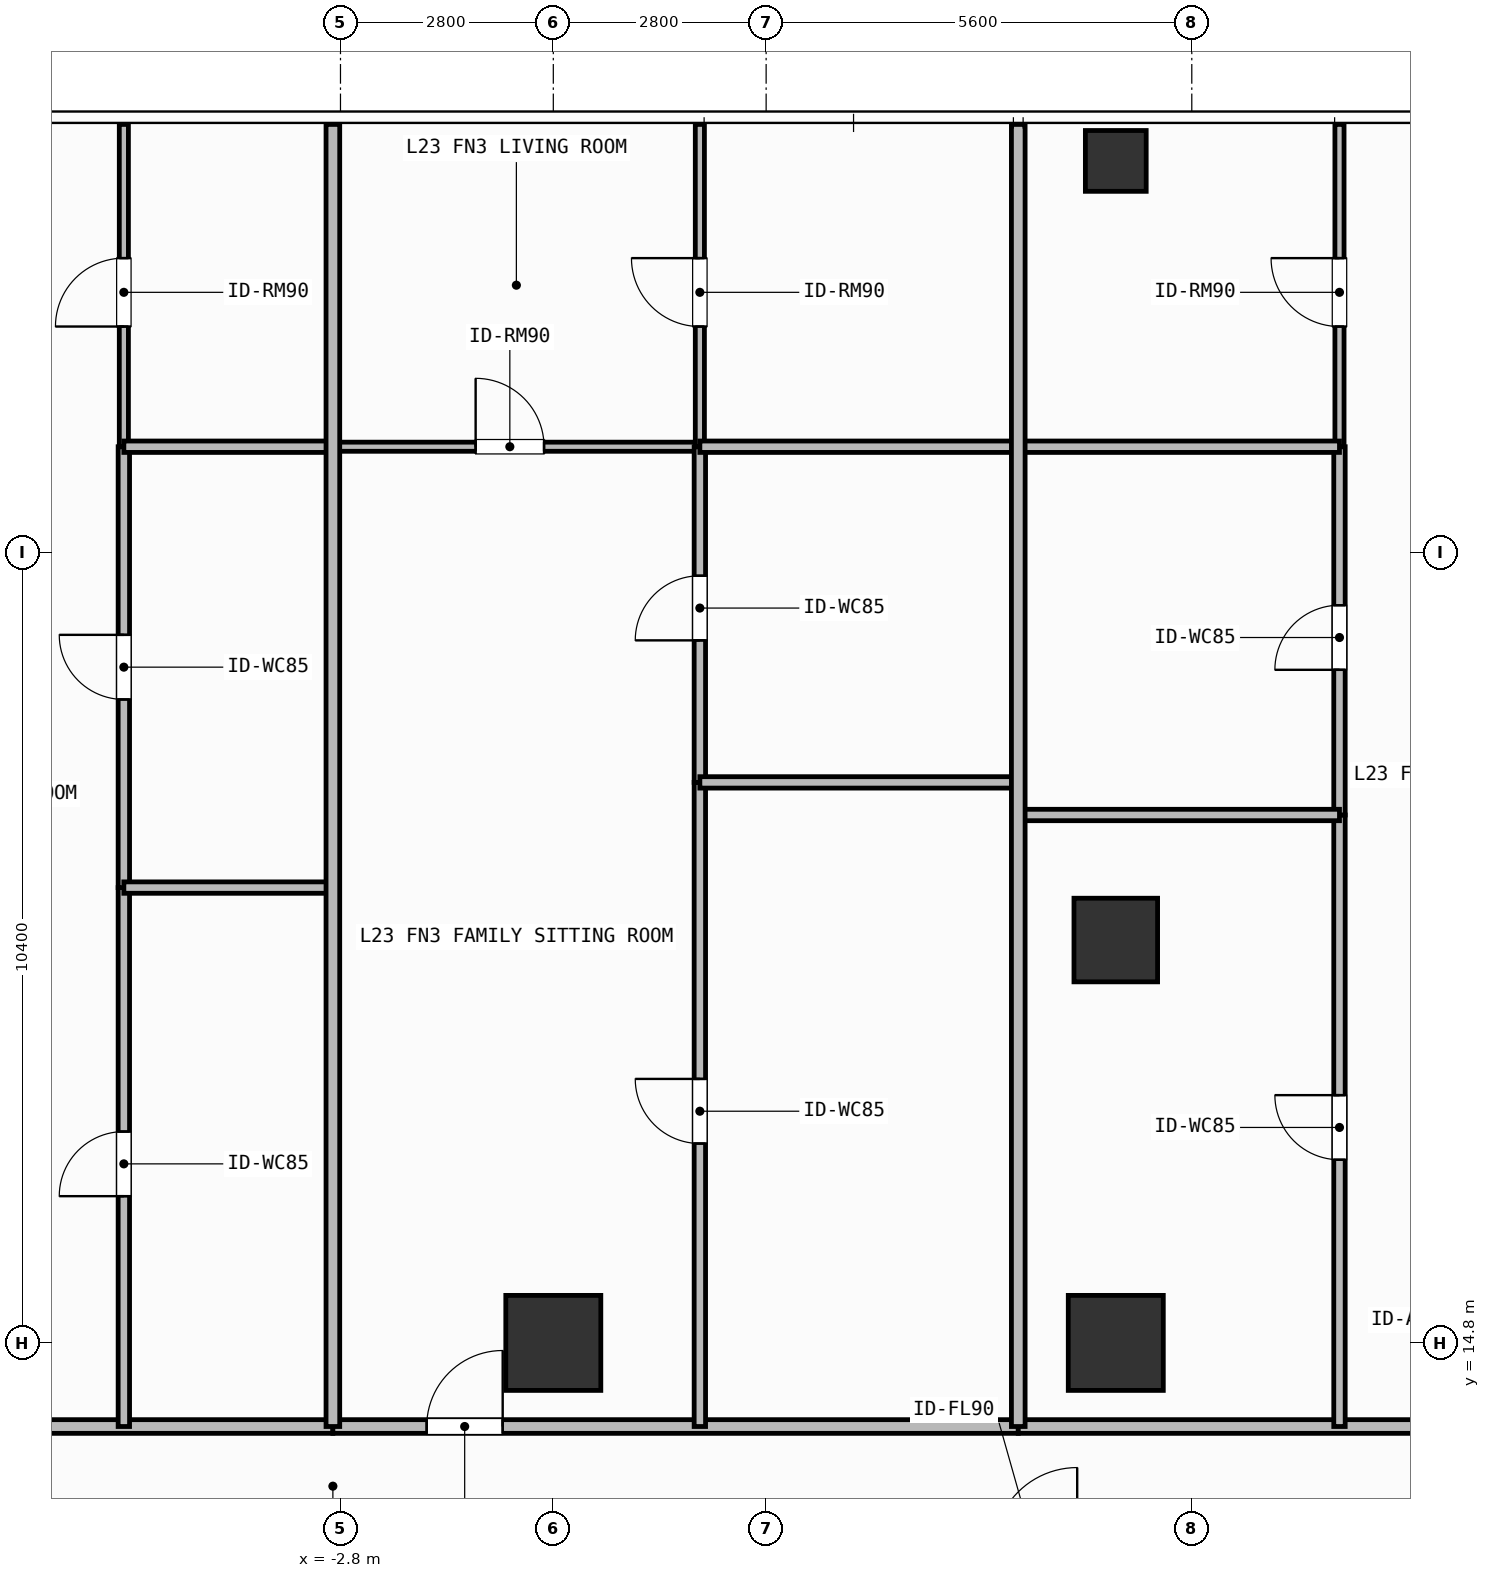
"""IFC4 building model, lengths in metres.
Left out: names, types, materials, properties, quantities, classifications, styles, units other than length and angle.
Written with IfcOpenShell. Run it as: python <this file> out.ifc"""

import sys

from ifc_helpers import new_model, si_unit, direction, frame, frame_2d, origin, origin_2d, place, context, subcontext, project, spatial, rectangle, hollow_rectangle, extrude, element, fill, save


model = new_model("IFC4")
c1 = context("Model", 3, precision=1e-05, world=origin(), true_north=direction((0.0, 1.0)))
c2 = subcontext(c1, "Body", "Model", "MODEL_VIEW")
j1 = project(units=[si_unit("LENGTHUNIT", "METRE"), si_unit("PLANEANGLEUNIT", "RADIAN")], contexts=[c1])
p1 = place(None, origin())
s1 = spatial("IfcSite", under=j1, at=p1, CompositionType="ELEMENT")
p2 = place(p1, origin())
s2 = spatial("IfcBuilding", under=s1, at=p2, CompositionType="ELEMENT")
p3 = place(p2, frame((0.0, 0.0, 93.0)))
s3 = spatial("IfcBuildingStorey", under=s2, at=p3, CompositionType="ELEMENT", Elevation=93.0)
for number, where, z_axis, x_axis in (
    (1, (0.0, 14.8, 0.0), (0.0, 0.0, 1.0), (1.0, 0.0, 0.0)),
    (2, (7.4, 14.8, 0.0), (0.0, 0.0, 1.0), (1.0, 0.0, 0.0)),
):
    element("IfcColumn", number, at=place(p3, frame(where, z_axis=z_axis, x_axis=x_axis)), inside=s3, PredefinedType="COLUMN", context=c2, shape_type="SweptSolid", body=[
        extrude(rectangle(XDim=1.25, YDim=1.25, at=origin_2d()), origin(), (0.0, 0.0, 1.0), 3.9),
    ])
p4 = place(p3, frame((7.4, 20.1, 0.0), z_axis=(0.0, 0.0, 1.0), x_axis=(1.0, 0.0, 0.0)))
e3 = element("IfcColumn", 3, at=p4, inside=s3, PredefinedType="COLUMN", context=c2, shape_type="SweptSolid", body=[
    extrude(rectangle(XDim=1.1, YDim=1.1, at=origin_2d()), origin(), (0.0, 0.0, 1.0), 3.9),
])
p5 = place(p3, frame((7.4, 30.35, 0.0), z_axis=(0.0, 0.0, 1.0), x_axis=(1.0, 0.0, 0.0)))
e4 = element("IfcColumn", 4, at=p5, inside=s3, PredefinedType="COLUMN", context=c2, shape_type="SweptSolid", body=[
    extrude(hollow_rectangle(XDim=0.8, YDim=0.8, WallThickness=0.036, at=origin_2d()), origin(), (0.0, 0.0, 1.0), 3.9),
])
p6 = place(p3, frame((-9.786, 13.7, 0.0), z_axis=(0.0, 0.0, 1.0), x_axis=(1.0, 0.0, 0.0)))
e5 = element("IfcWall", 5, at=p6, inside=s3, PredefinedType="PARTITIONING", context=c2, shape_type="SweptSolid", body=[
    extrude(rectangle(XDim=6.886, YDim=0.18, at=frame_2d((3.443, 0.0))), origin(), (0.0, 0.0, 1.0), 3.68),
])
p7 = place(p6, frame((0.698, 0.0, 0.0)))
e6 = element("IfcOpeningElement", 6, at=p7, cuts=e5, PredefinedType="OPENING", context=c2, shape_type="SweptSolid", body=[
    extrude(rectangle(XDim=1.0, YDim=2.2, at=frame_2d((0.5, 1.1))), frame((0.0, 0.1, 0.0), z_axis=(0.0, -1.0, 0.0), x_axis=(1.0, 0.0, 0.0)), (0.0, 0.0, 1.0), 0.2),
])
p8 = place(p3, frame((-5.65, 13.7, 0.0), z_axis=(0.0, 0.0, 1.0), x_axis=(0.0, 1.0, 0.0)))
e7 = element("IfcWall", 7, at=p8, inside=s3, PredefinedType="PARTITIONING", context=c2, shape_type="SweptSolid", body=[
    extrude(rectangle(XDim=7.09, YDim=0.15, at=frame_2d((3.545, 0.0))), origin(), (0.0, 0.0, 1.0), 3.68),
])
p9 = place(p8, frame((3.03, 0.0, 0.0)))
e8 = element("IfcOpeningElement", 8, at=p9, cuts=e7, PredefinedType="OPENING", context=c2, shape_type="SweptSolid", body=[
    extrude(rectangle(XDim=0.85, YDim=2.1, at=frame_2d((0.425, 1.05))), frame((0.0, 0.085, 0.0), z_axis=(0.0, -1.0, 0.0), x_axis=(1.0, 0.0, 0.0)), (0.0, 0.0, 1.0), 0.17),
])
p10 = place(p3, frame((-5.65, 20.79, 0.0), z_axis=(0.0, 0.0, 1.0), x_axis=(0.0, 1.0, 0.0)))
e9 = element("IfcWall", 9, at=p10, inside=s3, PredefinedType="PARTITIONING", context=c2, shape_type="SweptSolid", body=[
    extrude(rectangle(XDim=5.8, YDim=0.15, at=frame_2d((2.9, 0.0))), origin(), (0.0, 0.0, 1.0), 3.68),
])
p11 = place(p10, frame((2.475, 0.0, 0.0)))
e10 = element("IfcOpeningElement", 10, at=p11, cuts=e9, PredefinedType="OPENING", context=c2, shape_type="SweptSolid", body=[
    extrude(rectangle(XDim=0.85, YDim=2.1, at=frame_2d((0.425, 1.05))), frame((0.0, 0.085, 0.0), z_axis=(0.0, -1.0, 0.0), x_axis=(1.0, 0.0, 0.0)), (0.0, 0.0, 1.0), 0.17),
])
p12 = place(p3, frame((-5.65, 26.59, 0.0), z_axis=(0.0, 0.0, 1.0), x_axis=(0.0, 1.0, 0.0)))
e11 = element("IfcWall", 11, at=p12, inside=s3, PredefinedType="PARTITIONING", context=c2, shape_type="SweptSolid", body=[
    extrude(rectangle(XDim=4.24, YDim=0.12, at=frame_2d((2.12, 0.0))), origin(), (0.0, 0.0, 1.0), 3.68),
])
p13 = place(p12, frame((1.581, 0.0, 0.0)))
e12 = element("IfcOpeningElement", 12, at=p13, cuts=e11, PredefinedType="OPENING", context=c2, shape_type="SweptSolid", body=[
    extrude(rectangle(XDim=0.9, YDim=2.1, at=frame_2d((0.45, 1.05))), frame((0.0, 0.07, 0.0), z_axis=(0.0, -1.0, 0.0), x_axis=(1.0, 0.0, 0.0)), (0.0, 0.0, 1.0), 0.14),
])
p14 = place(p3, frame((-2.9, 13.7, 0.0), z_axis=(0.0, 0.0, 1.0), x_axis=(1.0, 0.0, 0.0)))
e13 = element("IfcWall", 13, at=p14, inside=s3, PredefinedType="PARTITIONING", context=c2, shape_type="SweptSolid", body=[
    extrude(rectangle(XDim=9.017, YDim=0.18, at=frame_2d((4.508, 0.0))), origin(), (0.0, 0.0, 1.0), 3.68),
])
p15 = place(p14, frame((1.234, 0.0, 0.0)))
e14 = element("IfcOpeningElement", 14, at=p15, cuts=e13, PredefinedType="OPENING", context=c2, shape_type="SweptSolid", body=[
    extrude(rectangle(XDim=1.0, YDim=2.2, at=frame_2d((0.5, 1.1))), frame((0.0, 0.1, 0.0), z_axis=(0.0, -1.0, 0.0), x_axis=(1.0, 0.0, 0.0)), (0.0, 0.0, 1.0), 0.2),
])
p16 = place(p3, frame((-2.9, 26.59, 0.0), z_axis=(0.0, 0.0, 1.0), x_axis=(1.0, 0.0, 0.0)))
e15 = element("IfcWall", 15, at=p16, inside=s3, PredefinedType="PARTITIONING", context=c2, shape_type="SweptSolid", body=[
    extrude(rectangle(XDim=4.828, YDim=0.12, at=frame_2d((2.414, 0.0))), origin(), (0.0, 0.0, 1.0), 3.68),
])
p17 = place(p16, frame((1.878, 0.0, 0.0)))
e16 = element("IfcOpeningElement", 16, at=p17, cuts=e15, PredefinedType="OPENING", context=c2, shape_type="SweptSolid", body=[
    extrude(rectangle(XDim=0.9, YDim=2.1, at=frame_2d((0.45, 1.05))), frame((0.0, 0.07, 0.0), z_axis=(0.0, -1.0, 0.0), x_axis=(1.0, 0.0, 0.0)), (0.0, 0.0, 1.0), 0.14),
])
p18 = place(p3, frame((1.928, 13.7, 0.0), z_axis=(0.0, 0.0, 1.0), x_axis=(0.0, 1.0, 0.0)))
e17 = element("IfcWall", 17, at=p18, inside=s3, PredefinedType="PARTITIONING", context=c2, shape_type="SweptSolid", body=[
    extrude(rectangle(XDim=8.474, YDim=0.15, at=frame_2d((4.237, 0.0))), origin(), (0.0, 0.0, 1.0), 3.68),
])
p19 = place(p18, frame((3.723, 0.0, 0.0)))
e18 = element("IfcOpeningElement", 18, at=p19, cuts=e17, PredefinedType="OPENING", context=c2, shape_type="SweptSolid", body=[
    extrude(rectangle(XDim=0.85, YDim=2.1, at=frame_2d((0.425, 1.05))), frame((0.0, 0.085, 0.0), z_axis=(0.0, -1.0, 0.0), x_axis=(1.0, 0.0, 0.0)), (0.0, 0.0, 1.0), 0.17),
])
p20 = place(p3, frame((1.928, 22.174, 0.0), z_axis=(0.0, 0.0, 1.0), x_axis=(0.0, 1.0, 0.0)))
e19 = element("IfcWall", 19, at=p20, inside=s3, PredefinedType="PARTITIONING", context=c2, shape_type="SweptSolid", body=[
    extrude(rectangle(XDim=4.416, YDim=0.15, at=frame_2d((2.208, 0.0))), origin(), (0.0, 0.0, 1.0), 3.68),
])
p21 = place(p20, frame((1.868, 0.0, 0.0)))
e20 = element("IfcOpeningElement", 20, at=p21, cuts=e19, PredefinedType="OPENING", context=c2, shape_type="SweptSolid", body=[
    extrude(rectangle(XDim=0.85, YDim=2.1, at=frame_2d((0.425, 1.05))), frame((0.0, 0.085, 0.0), z_axis=(0.0, -1.0, 0.0), x_axis=(1.0, 0.0, 0.0)), (0.0, 0.0, 1.0), 0.17),
])
p22 = place(p3, frame((1.928, 26.59, 0.0), z_axis=(0.0, 0.0, 1.0), x_axis=(0.0, 1.0, 0.0)))
e21 = element("IfcWall", 21, at=p22, inside=s3, PredefinedType="PARTITIONING", context=c2, shape_type="SweptSolid", body=[
    extrude(rectangle(XDim=4.24, YDim=0.12, at=frame_2d((2.12, 0.0))), origin(), (0.0, 0.0, 1.0), 3.68),
])
p23 = place(p22, frame((1.581, 0.0, 0.0)))
e22 = element("IfcOpeningElement", 22, at=p23, cuts=e21, PredefinedType="OPENING", context=c2, shape_type="SweptSolid", body=[
    extrude(rectangle(XDim=0.9, YDim=2.1, at=frame_2d((0.45, 1.05))), frame((0.0, 0.07, 0.0), z_axis=(0.0, -1.0, 0.0), x_axis=(1.0, 0.0, 0.0)), (0.0, 0.0, 1.0), 0.14),
])
p24 = place(p3, frame((6.117, 13.7, 0.0), z_axis=(0.0, 0.0, 1.0), x_axis=(1.0, 0.0, 0.0)))
e23 = element("IfcWall", 23, at=p24, inside=s3, PredefinedType="PARTITIONING", context=c2, shape_type="SweptSolid", body=[
    extrude(rectangle(XDim=12.503, YDim=0.18, at=frame_2d((6.251, 0.0))), origin(), (0.0, 0.0, 1.0), 3.68),
])
p25 = place(p24, frame((5.485, 0.0, 0.0)))
e24 = element("IfcOpeningElement", 24, at=p25, cuts=e23, PredefinedType="OPENING", context=c2, shape_type="SweptSolid", body=[
    extrude(rectangle(XDim=1.0, YDim=2.2, at=frame_2d((0.5, 1.1))), frame((0.0, 0.1, 0.0), z_axis=(0.0, -1.0, 0.0), x_axis=(1.0, 0.0, 0.0)), (0.0, 0.0, 1.0), 0.2),
])
p26 = place(p3, frame((10.343, 13.7, 0.0), z_axis=(0.0, 0.0, 1.0), x_axis=(0.0, 1.0, 0.0)))
e25 = element("IfcWall", 25, at=p26, inside=s3, PredefinedType="PARTITIONING", context=c2, shape_type="SweptSolid", body=[
    extrude(rectangle(XDim=8.045, YDim=0.15, at=frame_2d((4.022, 0.0))), origin(), (0.0, 0.0, 1.0), 3.68),
])
p27 = place(p26, frame((3.51, 0.0, 0.0)))
e26 = element("IfcOpeningElement", 26, at=p27, cuts=e25, PredefinedType="OPENING", context=c2, shape_type="SweptSolid", body=[
    extrude(rectangle(XDim=0.85, YDim=2.1, at=frame_2d((0.425, 1.05))), frame((0.0, 0.085, 0.0), z_axis=(0.0, -1.0, 0.0), x_axis=(1.0, 0.0, 0.0)), (0.0, 0.0, 1.0), 0.17),
])
p28 = place(p3, frame((10.343, 21.745, 0.0), z_axis=(0.0, 0.0, 1.0), x_axis=(0.0, 1.0, 0.0)))
e27 = element("IfcWall", 27, at=p28, inside=s3, PredefinedType="PARTITIONING", context=c2, shape_type="SweptSolid", body=[
    extrude(rectangle(XDim=4.845, YDim=0.15, at=frame_2d((2.422, 0.0))), origin(), (0.0, 0.0, 1.0), 3.68),
])
p29 = place(p28, frame((1.91, 0.0, 0.0)))
e28 = element("IfcOpeningElement", 28, at=p29, cuts=e27, PredefinedType="OPENING", context=c2, shape_type="SweptSolid", body=[
    extrude(rectangle(XDim=0.85, YDim=2.1, at=frame_2d((0.425, 1.05))), frame((0.0, 0.085, 0.0), z_axis=(0.0, -1.0, 0.0), x_axis=(1.0, 0.0, 0.0)), (0.0, 0.0, 1.0), 0.17),
])
p30 = place(p3, frame((10.343, 26.59, 0.0), z_axis=(0.0, 0.0, 1.0), x_axis=(0.0, 1.0, 0.0)))
e29 = element("IfcWall", 29, at=p30, inside=s3, PredefinedType="PARTITIONING", context=c2, shape_type="SweptSolid", body=[
    extrude(rectangle(XDim=4.24, YDim=0.12, at=frame_2d((2.12, 0.0))), origin(), (0.0, 0.0, 1.0), 3.68),
])
p31 = place(p30, frame((1.581, 0.0, 0.0)))
e30 = element("IfcOpeningElement", 30, at=p31, cuts=e29, PredefinedType="OPENING", context=c2, shape_type="SweptSolid", body=[
    extrude(rectangle(XDim=0.9, YDim=2.1, at=frame_2d((0.45, 1.05))), frame((0.0, 0.07, 0.0), z_axis=(0.0, -1.0, 0.0), x_axis=(1.0, 0.0, 0.0)), (0.0, 0.0, 1.0), 0.14),
])
for number, where, z_axis, x_axis in (
    (31, (-5.65, 20.79, 0.0), (0.0, 0.0, 1.0), (1.0, 0.0, 0.0)),
    (32, (-5.65, 26.59, 0.0), (0.0, 0.0, 1.0), (1.0, 0.0, 0.0)),
):
    element("IfcWall", number, at=place(p3, frame(where, z_axis=z_axis, x_axis=x_axis)), inside=s3, PredefinedType="PARTITIONING", context=c2, shape_type="SweptSolid", body=[
        extrude(rectangle(XDim=2.75, YDim=0.15, at=frame_2d((1.375, 0.0))), origin(), (0.0, 0.0, 1.0), 3.68),
    ])
for number, where, z_axis, x_axis in (
    (33, (1.928, 22.174, 0.0), (0.0, 0.0, 1.0), (1.0, 0.0, 0.0)),
    (34, (1.928, 26.59, 0.0), (0.0, 0.0, 1.0), (1.0, 0.0, 0.0)),
):
    element("IfcWall", number, at=place(p3, frame(where, z_axis=z_axis, x_axis=x_axis)), inside=s3, PredefinedType="PARTITIONING", context=c2, shape_type="SweptSolid", body=[
        extrude(rectangle(XDim=4.189, YDim=0.15, at=frame_2d((2.094, 0.0))), origin(), (0.0, 0.0, 1.0), 3.68),
    ])
p32 = place(p3, frame((-2.9, 13.7, 0.0), z_axis=(0.0, 0.0, 1.0), x_axis=(0.0, 1.0, 0.0)))
e35 = element("IfcWall", 35, at=p32, inside=s3, PredefinedType="PARTITIONING", context=c2, shape_type="SweptSolid", body=[
    extrude(rectangle(XDim=17.13, YDim=0.18, at=frame_2d((8.565, 0.0))), origin(), (0.0, 0.0, 1.0), 3.68),
])
for number, where, z_axis, x_axis in (
    (36, (6.117, 21.745, 0.0), (0.0, 0.0, 1.0), (1.0, 0.0, 0.0)),
    (37, (6.117, 26.59, 0.0), (0.0, 0.0, 1.0), (1.0, 0.0, 0.0)),
):
    element("IfcWall", number, at=place(p3, frame(where, z_axis=z_axis, x_axis=x_axis)), inside=s3, PredefinedType="PARTITIONING", context=c2, shape_type="SweptSolid", body=[
        extrude(rectangle(XDim=4.226, YDim=0.15, at=frame_2d((2.113, 0.0))), origin(), (0.0, 0.0, 1.0), 3.68),
    ])
p33 = place(p3, frame((6.117, 13.7, 0.0), z_axis=(0.0, 0.0, 1.0), x_axis=(0.0, 1.0, 0.0)))
e38 = element("IfcWall", 38, at=p33, inside=s3, PredefinedType="PARTITIONING", context=c2, shape_type="SweptSolid", body=[
    extrude(rectangle(XDim=17.13, YDim=0.18, at=frame_2d((8.565, 0.0))), origin(), (0.0, 0.0, 1.0), 3.68),
])
p34 = place(p9, origin())
e39 = element("IfcDoor", 39, at=p34, inside=s3, OperationType="SINGLE_SWING_LEFT", PredefinedType="DOOR", context=c2, shape_type="SweptSolid", body=[
    extrude(rectangle(XDim=0.85, YDim=2.1, at=frame_2d((0.425, 1.05))), frame((0.0, 0.025, 0.0), z_axis=(0.0, -1.0, 0.0), x_axis=(1.0, 0.0, 0.0)), (0.0, 0.0, 1.0), 0.05),
])
fill(e8, e39)
p35 = place(p11, origin())
e40 = element("IfcDoor", 40, at=p35, inside=s3, OperationType="SINGLE_SWING_RIGHT", PredefinedType="DOOR", context=c2, shape_type="SweptSolid", body=[
    extrude(rectangle(XDim=0.85, YDim=2.1, at=frame_2d((0.425, 1.05))), frame((0.0, 0.025, 0.0), z_axis=(0.0, -1.0, 0.0), x_axis=(1.0, 0.0, 0.0)), (0.0, 0.0, 1.0), 0.05),
])
fill(e10, e40)
p36 = place(p13, origin())
e41 = element("IfcDoor", 41, at=p36, inside=s3, OperationType="SINGLE_SWING_LEFT", PredefinedType="DOOR", context=c2, shape_type="SweptSolid", body=[
    extrude(rectangle(XDim=0.9, YDim=2.1, at=frame_2d((0.45, 1.05))), frame((0.0, 0.025, 0.0), z_axis=(0.0, -1.0, 0.0), x_axis=(1.0, 0.0, 0.0)), (0.0, 0.0, 1.0), 0.05),
])
fill(e12, e41)
p37 = place(p15, origin())
e42 = element("IfcDoor", 42, at=p37, inside=s3, OperationType="SINGLE_SWING_RIGHT", PredefinedType="DOOR", context=c2, shape_type="SweptSolid", body=[
    extrude(rectangle(XDim=1.0, YDim=2.2, at=frame_2d((0.5, 1.1))), frame((0.0, 0.025, 0.0), z_axis=(0.0, -1.0, 0.0), x_axis=(1.0, 0.0, 0.0)), (0.0, 0.0, 1.0), 0.05),
])
fill(e14, e42)
p38 = place(p17, origin())
e43 = element("IfcDoor", 43, at=p38, inside=s3, OperationType="SINGLE_SWING_LEFT", PredefinedType="DOOR", context=c2, shape_type="SweptSolid", body=[
    extrude(rectangle(XDim=0.9, YDim=2.1, at=frame_2d((0.45, 1.05))), frame((0.0, 0.025, 0.0), z_axis=(0.0, -1.0, 0.0), x_axis=(1.0, 0.0, 0.0)), (0.0, 0.0, 1.0), 0.05),
])
fill(e16, e43)
p39 = place(p19, origin())
e44 = element("IfcDoor", 44, at=p39, inside=s3, OperationType="SINGLE_SWING_RIGHT", PredefinedType="DOOR", context=c2, shape_type="SweptSolid", body=[
    extrude(rectangle(XDim=0.85, YDim=2.1, at=frame_2d((0.425, 1.05))), frame((0.0, 0.025, 0.0), z_axis=(0.0, -1.0, 0.0), x_axis=(1.0, 0.0, 0.0)), (0.0, 0.0, 1.0), 0.05),
])
fill(e18, e44)
p40 = place(p21, origin())
e45 = element("IfcDoor", 45, at=p40, inside=s3, OperationType="SINGLE_SWING_LEFT", PredefinedType="DOOR", context=c2, shape_type="SweptSolid", body=[
    extrude(rectangle(XDim=0.85, YDim=2.1, at=frame_2d((0.425, 1.05))), frame((0.0, 0.025, 0.0), z_axis=(0.0, -1.0, 0.0), x_axis=(1.0, 0.0, 0.0)), (0.0, 0.0, 1.0), 0.05),
])
fill(e20, e45)
p41 = place(p23, origin())
e46 = element("IfcDoor", 46, at=p41, inside=s3, OperationType="SINGLE_SWING_RIGHT", PredefinedType="DOOR", context=c2, shape_type="SweptSolid", body=[
    extrude(rectangle(XDim=0.9, YDim=2.1, at=frame_2d((0.45, 1.05))), frame((0.0, 0.025, 0.0), z_axis=(0.0, -1.0, 0.0), x_axis=(1.0, 0.0, 0.0)), (0.0, 0.0, 1.0), 0.05),
])
fill(e22, e46)
p42 = place(p27, origin())
e47 = element("IfcDoor", 47, at=p42, inside=s3, OperationType="SINGLE_SWING_RIGHT", PredefinedType="DOOR", context=c2, shape_type="SweptSolid", body=[
    extrude(rectangle(XDim=0.85, YDim=2.1, at=frame_2d((0.425, 1.05))), frame((0.0, 0.025, 0.0), z_axis=(0.0, -1.0, 0.0), x_axis=(1.0, 0.0, 0.0)), (0.0, 0.0, 1.0), 0.05),
])
fill(e26, e47)
p43 = place(p29, origin())
e48 = element("IfcDoor", 48, at=p43, inside=s3, OperationType="SINGLE_SWING_LEFT", PredefinedType="DOOR", context=c2, shape_type="SweptSolid", body=[
    extrude(rectangle(XDim=0.85, YDim=2.1, at=frame_2d((0.425, 1.05))), frame((0.0, 0.025, 0.0), z_axis=(0.0, -1.0, 0.0), x_axis=(1.0, 0.0, 0.0)), (0.0, 0.0, 1.0), 0.05),
])
fill(e28, e48)
p44 = place(p31, origin())
e49 = element("IfcDoor", 49, at=p44, inside=s3, OperationType="SINGLE_SWING_RIGHT", PredefinedType="DOOR", context=c2, shape_type="SweptSolid", body=[
    extrude(rectangle(XDim=0.9, YDim=2.1, at=frame_2d((0.45, 1.05))), frame((0.0, 0.025, 0.0), z_axis=(0.0, -1.0, 0.0), x_axis=(1.0, 0.0, 0.0)), (0.0, 0.0, 1.0), 0.05),
])
fill(e30, e49)
save(model, sys.argv[1])
